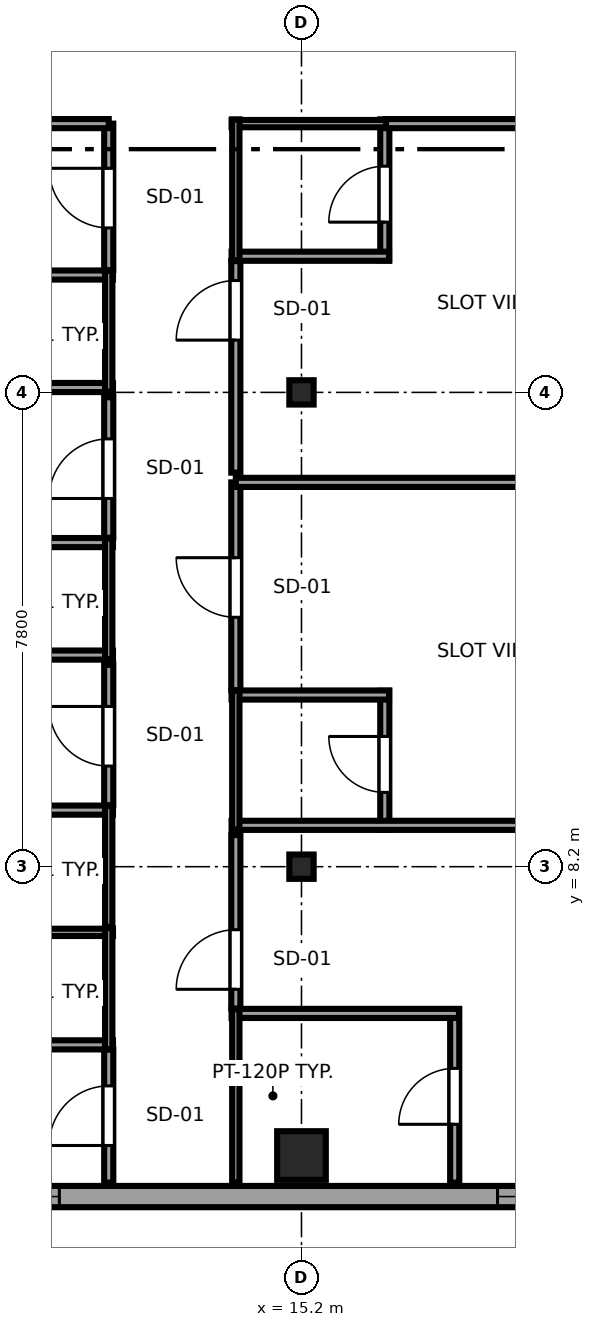
"""IFC4 building model, lengths in metres.
Left out: names, types, materials, properties, quantities, classifications, styles, units other than length and angle.
Written with IfcOpenShell. Run it as: python <this file> out.ifc"""

import sys

from ifc_helpers import new_model, si_unit, direction, frame, frame_2d, origin, origin_2d, place, context, subcontext, project, spatial, rectangle, i_section, extrude, source, transform, mapped, element, fill, save


model = new_model("IFC4")
c1 = context("Model", 3, precision=1e-05, world=origin(), true_north=direction((0.0, 1.0)))
c2 = subcontext(c1, "Body", "Model", "MODEL_VIEW")
j1 = project(units=[si_unit("LENGTHUNIT", "METRE"), si_unit("PLANEANGLEUNIT", "RADIAN")], contexts=[c1])
p1 = place(None, origin())
s1 = spatial("IfcSite", under=j1, at=p1, CompositionType="ELEMENT")
p2 = place(p1, origin())
s2 = spatial("IfcBuilding", under=s1, at=p2, CompositionType="ELEMENT")
p3 = place(p2, frame((0.0, 0.0, 191.1)))
s3 = spatial("IfcBuildingStorey", under=s2, at=p3, CompositionType="ELEMENT", Elevation=191.1)
m1 = source(origin(), c2, "Body", "SweptSolid", [
    extrude(rectangle(XDim=0.8, YDim=0.8, at=origin_2d()), origin(), (0.0, 0.0, 1.0), 3.55),
])
p4 = place(p3, frame((15.2, 3.45, 0.0), z_axis=(0.0, 0.0, 1.0), x_axis=(1.0, 0.0, 0.0)))
e1 = element("IfcColumn", 1, at=p4, inside=s3, PredefinedType="COLUMN", context=c2, shape_type="MappedRepresentation", body=[
    mapped(m1, transform((0.0, 0.0, 0.0), x_axis=(1.0, 0.0, 0.0), y_axis=(0.0, 1.0, 0.0), z_axis=(0.0, 0.0, 1.0), scale=1.0)),
])
m2 = source(origin(), c2, "Body", "SweptSolid", [
    extrude(i_section(OverallWidth=0.4, OverallDepth=0.4, WebThickness=0.02, FlangeThickness=0.035, at=origin_2d()), origin(), (0.0, 0.0, 1.0), 3.55),
])
for number, where, z_axis, x_axis in (
    (2, (15.2, 8.2, 0.0), (0.0, 0.0, 1.0), (1.0, 0.0, 0.0)),
    (3, (15.2, 16.0, 0.0), (0.0, 0.0, 1.0), (1.0, 0.0, 0.0)),
):
    element("IfcColumn", number, at=place(p3, frame(where, z_axis=z_axis, x_axis=x_axis)), inside=s3, PredefinedType="COLUMN", context=c2, shape_type="MappedRepresentation", body=[
        mapped(m2, transform((0.0, 0.0, 0.0), x_axis=(1.0, 0.0, 0.0), y_axis=(0.0, 1.0, 0.0), z_axis=(0.0, 0.0, 1.0), scale=1.0)),
    ])
p5 = place(p3, frame((7.017, 2.775, 0.0), z_axis=(0.0, 0.0, 1.0), x_axis=(1.0, 0.0, 0.0)))
e4 = element("IfcWall", 4, at=p5, inside=s3, PredefinedType="SOLIDWALL", context=c2, shape_type="SweptSolid", body=[
    extrude(rectangle(XDim=15.608, YDim=0.35, at=frame_2d((7.804, 0.0))), origin(), (0.0, 0.0, 1.0), 3.37),
])
p6 = place(p5, frame((1.801, 0.0, 0.68)))
e5 = element("IfcOpeningElement", 5, at=p6, cuts=e4, PredefinedType="OPENING", context=c2, shape_type="SweptSolid", body=[
    extrude(rectangle(XDim=2.4, YDim=1.9, at=frame_2d((1.2, 0.95))), frame((0.0, 0.185, 0.0), z_axis=(0.0, -1.0, 0.0), x_axis=(1.0, 0.0, 0.0)), (0.0, 0.0, 1.0), 0.37),
])
p7 = place(p5, frame((11.407, 0.0, 0.68)))
e6 = element("IfcOpeningElement", 6, at=p7, cuts=e4, PredefinedType="OPENING", context=c2, shape_type="SweptSolid", body=[
    extrude(rectangle(XDim=2.4, YDim=1.9, at=frame_2d((1.2, 0.95))), frame((0.0, 0.185, 0.0), z_axis=(0.0, -1.0, 0.0), x_axis=(1.0, 0.0, 0.0)), (0.0, 0.0, 1.0), 0.37),
])
p8 = place(p3, frame((9.51, 5.27, 0.0), z_axis=(0.0, 0.0, 1.0), x_axis=(1.0, 0.0, 0.0)))
e7 = element("IfcWall", 7, at=p8, inside=s3, PredefinedType="PARTITIONING", context=c2, shape_type="SweptSolid", body=[
    extrude(rectangle(XDim=2.59, YDim=0.15, at=frame_2d((1.295, 0.0))), origin(), (0.0, 0.0, 1.0), 3.37),
])
p9 = place(p3, frame((9.51, 7.12, 0.0), z_axis=(0.0, 0.0, 1.0), x_axis=(1.0, 0.0, 0.0)))
e8 = element("IfcWall", 8, at=p9, inside=s3, PredefinedType="PLUMBINGWALL", context=c2, shape_type="SweptSolid", body=[
    extrude(rectangle(XDim=2.59, YDim=0.12, at=frame_2d((1.295, 0.0))), origin(), (0.0, 0.0, 1.0), 3.37),
])
p10 = place(p3, frame((12.03, 5.2, 0.0), z_axis=(0.0, 0.0, 1.0), x_axis=(0.0, 1.0, 0.0)))
e9 = element("IfcWall", 9, at=p10, inside=s3, PredefinedType="PLUMBINGWALL", context=c2, shape_type="SweptSolid", body=[
    extrude(rectangle(XDim=1.99, YDim=0.12, at=frame_2d((0.995, 0.0))), origin(), (0.0, 0.0, 1.0), 3.37),
])
p11 = place(p3, frame((9.51, 9.13, 0.0), z_axis=(0.0, 0.0, 1.0), x_axis=(1.0, 0.0, 0.0)))
e10 = element("IfcWall", 10, at=p11, inside=s3, PredefinedType="PARTITIONING", context=c2, shape_type="SweptSolid", body=[
    extrude(rectangle(XDim=2.59, YDim=0.15, at=frame_2d((1.295, 0.0))), origin(), (0.0, 0.0, 1.0), 3.37),
])
p12 = place(p3, frame((12.03, 7.21, 0.0), z_axis=(0.0, 0.0, 1.0), x_axis=(0.0, 1.0, 0.0)))
e11 = element("IfcWall", 11, at=p12, inside=s3, PredefinedType="PLUMBINGWALL", context=c2, shape_type="SweptSolid", body=[
    extrude(rectangle(XDim=1.99, YDim=0.12, at=frame_2d((0.995, 0.0))), origin(), (0.0, 0.0, 1.0), 3.37),
])
p13 = place(p3, frame((3.005, 11.68, 0.0), z_axis=(0.0, 0.0, 1.0), x_axis=(1.0, 0.0, 0.0)))
e12 = element("IfcWall", 12, at=p13, inside=s3, PredefinedType="PARTITIONING", context=c2, shape_type="SweptSolid", body=[
    extrude(rectangle(XDim=9.095, YDim=0.15, at=frame_2d((4.548, 0.0))), origin(), (0.0, 0.0, 1.0), 3.37),
])
p14 = place(p3, frame((9.51, 13.53, 0.0), z_axis=(0.0, 0.0, 1.0), x_axis=(1.0, 0.0, 0.0)))
e13 = element("IfcWall", 13, at=p14, inside=s3, PredefinedType="PARTITIONING", context=c2, shape_type="SweptSolid", body=[
    extrude(rectangle(XDim=2.59, YDim=0.15, at=frame_2d((1.295, 0.0))), origin(), (0.0, 0.0, 1.0), 3.37),
])
p15 = place(p3, frame((12.03, 11.61, 0.0), z_axis=(0.0, 0.0, 1.0), x_axis=(0.0, 1.0, 0.0)))
e14 = element("IfcWall", 14, at=p15, inside=s3, PredefinedType="PLUMBINGWALL", context=c2, shape_type="SweptSolid", body=[
    extrude(rectangle(XDim=1.99, YDim=0.12, at=frame_2d((0.995, 0.0))), origin(), (0.0, 0.0, 1.0), 3.37),
])
p16 = place(p3, frame((3.005, 16.08, 0.0), z_axis=(0.0, 0.0, 1.0), x_axis=(1.0, 0.0, 0.0)))
e15 = element("IfcWall", 15, at=p16, inside=s3, PredefinedType="PARTITIONING", context=c2, shape_type="SweptSolid", body=[
    extrude(rectangle(XDim=9.095, YDim=0.15, at=frame_2d((4.548, 0.0))), origin(), (0.0, 0.0, 1.0), 2.758),
])
p17 = place(p3, frame((9.51, 17.93, 0.0), z_axis=(0.0, 0.0, 1.0), x_axis=(1.0, 0.0, 0.0)))
e16 = element("IfcWall", 16, at=p17, inside=s3, PredefinedType="PARTITIONING", context=c2, shape_type="SweptSolid", body=[
    extrude(rectangle(XDim=2.59, YDim=0.15, at=frame_2d((1.295, 0.0))), origin(), (0.0, 0.0, 1.0), 3.37),
])
p18 = place(p3, frame((12.03, 16.01, 0.0), z_axis=(0.0, 0.0, 1.0), x_axis=(0.0, 1.0, 0.0)))
e17 = element("IfcWall", 17, at=p18, inside=s3, PredefinedType="PLUMBINGWALL", context=c2, shape_type="SweptSolid", body=[
    extrude(rectangle(XDim=1.99, YDim=0.12, at=frame_2d((0.995, 0.0))), origin(), (0.0, 0.0, 1.0), 3.37),
])
p19 = place(p3, frame((17.72, 3.005, 0.0), z_axis=(0.0, 0.0, 1.0), x_axis=(0.0, 1.0, 0.0)))
e18 = element("IfcWall", 18, at=p19, inside=s3, PredefinedType="PARTITIONING", context=c2, shape_type="SweptSolid", body=[
    extrude(rectangle(XDim=2.852, YDim=0.15, at=frame_2d((1.426, 0.0))), origin(), (0.0, 0.0, 1.0), 3.37),
])
p20 = place(p19, frame((0.958, 0.0, 0.0)))
e19 = element("IfcOpeningElement", 19, at=p20, cuts=e18, PredefinedType="OPENING", context=c2, shape_type="SweptSolid", body=[
    extrude(rectangle(XDim=0.92, YDim=2.01, at=frame_2d((0.46, 1.005))), frame((0.0, 0.085, 0.0), z_axis=(0.0, -1.0, 0.0), x_axis=(1.0, 0.0, 0.0)), (0.0, 0.0, 1.0), 0.17),
])
p21 = place(p3, frame((14.05, 5.787, 0.0), z_axis=(0.0, 0.0, 1.0), x_axis=(1.0, 0.0, 0.0)))
e20 = element("IfcWall", 20, at=p21, inside=s3, PredefinedType="PARTITIONING", context=c2, shape_type="SweptSolid", body=[
    extrude(rectangle(XDim=3.74, YDim=0.15, at=frame_2d((1.87, 0.0))), origin(), (0.0, 0.0, 1.0), 3.37),
])
p22 = place(p3, frame((14.12, 3.005, 0.0), z_axis=(0.0, 0.0, 1.0), x_axis=(0.0, 1.0, 0.0)))
e21 = element("IfcWall", 21, at=p22, inside=s3, PredefinedType="PLUMBINGWALL", context=c2, shape_type="SweptSolid", body=[
    extrude(rectangle(XDim=2.852, YDim=0.12, at=frame_2d((1.426, 0.0))), origin(), (0.0, 0.0, 1.0), 3.37),
])
p23 = place(p3, frame((16.57, 8.81, 0.0), z_axis=(0.0, 0.0, 1.0), x_axis=(0.0, 1.0, 0.0)))
e22 = element("IfcWall", 22, at=p23, inside=s3, PredefinedType="PARTITIONING", context=c2, shape_type="SweptSolid", body=[
    extrude(rectangle(XDim=2.283, YDim=0.15, at=frame_2d((1.142, 0.0))), origin(), (0.0, 0.0, 1.0), 3.37),
])
p24 = place(p23, frame((0.612, 0.0, 0.0)))
e23 = element("IfcOpeningElement", 23, at=p24, cuts=e22, PredefinedType="OPENING", context=c2, shape_type="SweptSolid", body=[
    extrude(rectangle(XDim=0.92, YDim=2.01, at=frame_2d((0.46, 1.005))), frame((0.0, 0.085, 0.0), z_axis=(0.0, -1.0, 0.0), x_axis=(1.0, 0.0, 0.0)), (0.0, 0.0, 1.0), 0.17),
])
p25 = place(p3, frame((14.05, 8.88, 0.0), z_axis=(0.0, 0.0, 1.0), x_axis=(1.0, 0.0, 0.0)))
e24 = element("IfcWall", 24, at=p25, inside=s3, PredefinedType="PARTITIONING", context=c2, shape_type="SweptSolid", body=[
    extrude(rectangle(XDim=8.3, YDim=0.15, at=frame_2d((4.15, 0.0))), origin(), (0.0, 0.0, 1.0), 3.37),
])
p26 = place(p3, frame((14.05, 11.023, 0.0), z_axis=(0.0, 0.0, 1.0), x_axis=(1.0, 0.0, 0.0)))
e25 = element("IfcWall", 25, at=p26, inside=s3, PredefinedType="PARTITIONING", context=c2, shape_type="SweptSolid", body=[
    extrude(rectangle(XDim=2.59, YDim=0.15, at=frame_2d((1.295, 0.0))), origin(), (0.0, 0.0, 1.0), 3.37),
])
p27 = place(p3, frame((14.12, 8.81, 0.0), z_axis=(0.0, 0.0, 1.0), x_axis=(0.0, 1.0, 0.0)))
e26 = element("IfcWall", 26, at=p27, inside=s3, PredefinedType="PLUMBINGWALL", context=c2, shape_type="SweptSolid", body=[
    extrude(rectangle(XDim=2.283, YDim=0.12, at=frame_2d((1.142, 0.0))), origin(), (0.0, 0.0, 1.0), 3.37),
])
p28 = place(p3, frame((16.57, 18.169, 0.0), z_axis=(0.0, 0.0, 1.0), x_axis=(0.0, 1.0, 0.0)))
e27 = element("IfcWall", 27, at=p28, inside=s3, PredefinedType="PARTITIONING", context=c2, shape_type="SweptSolid", body=[
    extrude(rectangle(XDim=2.321, YDim=0.15, at=frame_2d((1.161, 0.0))), origin(), (0.0, 0.0, 1.0), 3.37),
])
p29 = place(p28, frame((0.631, 0.0, 0.0)))
e28 = element("IfcOpeningElement", 28, at=p29, cuts=e27, PredefinedType="OPENING", context=c2, shape_type="SweptSolid", body=[
    extrude(rectangle(XDim=0.92, YDim=2.01, at=frame_2d((0.46, 1.005))), frame((0.0, 0.085, 0.0), z_axis=(0.0, -1.0, 0.0), x_axis=(1.0, 0.0, 0.0)), (0.0, 0.0, 1.0), 0.17),
])
p30 = place(p3, frame((14.05, 18.239, 0.0), z_axis=(0.0, 0.0, 1.0), x_axis=(1.0, 0.0, 0.0)))
e29 = element("IfcWall", 29, at=p30, inside=s3, PredefinedType="PARTITIONING", context=c2, shape_type="SweptSolid", body=[
    extrude(rectangle(XDim=2.59, YDim=0.15, at=frame_2d((1.295, 0.0))), origin(), (0.0, 0.0, 1.0), 3.37),
])
p31 = place(p3, frame((14.05, 20.42, 0.0), z_axis=(0.0, 0.0, 1.0), x_axis=(1.0, 0.0, 0.0)))
e30 = element("IfcWall", 30, at=p31, inside=s3, PredefinedType="PLUMBINGWALL", context=c2, shape_type="SweptSolid", body=[
    extrude(rectangle(XDim=2.59, YDim=0.12, at=frame_2d((1.295, 0.0))), origin(), (0.0, 0.0, 1.0), 3.37),
])
p32 = place(p3, frame((14.12, 18.169, 0.0), z_axis=(0.0, 0.0, 1.0), x_axis=(0.0, 1.0, 0.0)))
e31 = element("IfcWall", 31, at=p32, inside=s3, PredefinedType="PLUMBINGWALL", context=c2, shape_type="SweptSolid", body=[
    extrude(rectangle(XDim=2.321, YDim=0.12, at=frame_2d((1.161, 0.0))), origin(), (0.0, 0.0, 1.0), 3.37),
])
p33 = place(p3, frame((12.03, 3.005, 0.0), z_axis=(0.0, 0.0, 1.0), x_axis=(0.0, 1.0, 0.0)))
e32 = element("IfcWall", 32, at=p33, inside=s3, PredefinedType="PARTITIONING", context=c2, shape_type="SweptSolid", body=[
    extrude(rectangle(XDim=2.185, YDim=0.15, at=frame_2d((1.093, 0.0))), origin(), (0.0, 0.0, 1.0), 3.37),
])
p34 = place(p33, frame((0.61, 0.0, 0.0)))
e33 = element("IfcOpeningElement", 33, at=p34, cuts=e32, PredefinedType="OPENING", context=c2, shape_type="SweptSolid", body=[
    extrude(rectangle(XDim=0.98, YDim=2.12, at=frame_2d((0.49, 1.06))), frame((0.0, 0.085, 0.0), z_axis=(0.0, -1.0, 0.0), x_axis=(1.0, 0.0, 0.0)), (0.0, 0.0, 1.0), 0.17),
])
p35 = place(p3, frame((12.03, 9.21, 0.0), z_axis=(0.0, 0.0, 1.0), x_axis=(0.0, 1.0, 0.0)))
e34 = element("IfcWall", 34, at=p35, inside=s3, PredefinedType="PARTITIONING", context=c2, shape_type="SweptSolid", body=[
    extrude(rectangle(XDim=2.31, YDim=0.15, at=frame_2d((1.155, 0.0))), origin(), (0.0, 0.0, 1.0), 3.37),
])
p36 = place(p35, frame((0.645, 0.0, 0.0)))
e35 = element("IfcOpeningElement", 35, at=p36, cuts=e34, PredefinedType="OPENING", context=c2, shape_type="SweptSolid", body=[
    extrude(rectangle(XDim=0.98, YDim=2.12, at=frame_2d((0.49, 1.06))), frame((0.0, 0.085, 0.0), z_axis=(0.0, -1.0, 0.0), x_axis=(1.0, 0.0, 0.0)), (0.0, 0.0, 1.0), 0.17),
])
p37 = place(p3, frame((12.03, 13.61, 0.0), z_axis=(0.0, 0.0, 1.0), x_axis=(0.0, 1.0, 0.0)))
e36 = element("IfcWall", 36, at=p37, inside=s3, PredefinedType="PARTITIONING", context=c2, shape_type="SweptSolid", body=[
    extrude(rectangle(XDim=2.31, YDim=0.15, at=frame_2d((1.155, 0.0))), origin(), (0.0, 0.0, 1.0), 3.37),
])
p38 = place(p37, frame((0.645, 0.0, 0.0)))
e37 = element("IfcOpeningElement", 37, at=p38, cuts=e36, PredefinedType="OPENING", context=c2, shape_type="SweptSolid", body=[
    extrude(rectangle(XDim=0.98, YDim=2.12, at=frame_2d((0.49, 1.06))), frame((0.0, 0.085, 0.0), z_axis=(0.0, -1.0, 0.0), x_axis=(1.0, 0.0, 0.0)), (0.0, 0.0, 1.0), 0.17),
])
p39 = place(p3, frame((12.03, 18.01, 0.0), z_axis=(0.0, 0.0, 1.0), x_axis=(0.0, 1.0, 0.0)))
e38 = element("IfcWall", 38, at=p39, inside=s3, PredefinedType="PARTITIONING", context=c2, shape_type="SweptSolid", body=[
    extrude(rectangle(XDim=2.41, YDim=0.15, at=frame_2d((1.205, 0.0))), origin(), (0.0, 0.0, 1.0), 3.37),
])
p40 = place(p39, frame((0.695, 0.0, 0.0)))
e39 = element("IfcOpeningElement", 39, at=p40, cuts=e38, PredefinedType="OPENING", context=c2, shape_type="SweptSolid", body=[
    extrude(rectangle(XDim=0.98, YDim=2.12, at=frame_2d((0.49, 1.06))), frame((0.0, 0.085, 0.0), z_axis=(0.0, -1.0, 0.0), x_axis=(1.0, 0.0, 0.0)), (0.0, 0.0, 1.0), 0.17),
])
p41 = place(p3, frame((3.005, 20.42, 0.0), z_axis=(0.0, 0.0, 1.0), x_axis=(1.0, 0.0, 0.0)))
e40 = element("IfcWall", 40, at=p41, inside=s3, PredefinedType="PARTITIONING", context=c2, shape_type="SweptSolid", body=[
    extrude(rectangle(XDim=9.025, YDim=0.15, at=frame_2d((4.513, 0.0))), origin(), (0.0, 0.0, 1.0), 3.37),
])
p42 = place(p3, frame((14.12, 5.867, 0.0), z_axis=(0.0, 0.0, 1.0), x_axis=(0.0, 1.0, 0.0)))
e41 = element("IfcWall", 41, at=p42, inside=s3, PredefinedType="PARTITIONING", context=c2, shape_type="SweptSolid", body=[
    extrude(rectangle(XDim=2.853, YDim=0.15, at=frame_2d((1.427, 0.0))), origin(), (0.0, 0.0, 1.0), 3.37),
])
p43 = place(p42, frame((0.316, 0.0, 0.0)))
e42 = element("IfcOpeningElement", 42, at=p43, cuts=e41, PredefinedType="OPENING", context=c2, shape_type="SweptSolid", body=[
    extrude(rectangle(XDim=0.98, YDim=2.12, at=frame_2d((0.49, 1.06))), frame((0.0, 0.085, 0.0), z_axis=(0.0, -1.0, 0.0), x_axis=(1.0, 0.0, 0.0)), (0.0, 0.0, 1.0), 0.17),
])
p44 = place(p3, frame((14.12, 11.103, 0.0), z_axis=(0.0, 0.0, 1.0), x_axis=(0.0, 1.0, 0.0)))
e43 = element("IfcWall", 43, at=p44, inside=s3, PredefinedType="PARTITIONING", context=c2, shape_type="SweptSolid", body=[
    extrude(rectangle(XDim=3.417, YDim=0.15, at=frame_2d((1.708, 0.0))), origin(), (0.0, 0.0, 1.0), 3.37),
])
p45 = place(p44, frame((1.198, 0.0, 0.0)))
e44 = element("IfcOpeningElement", 44, at=p45, cuts=e43, PredefinedType="OPENING", context=c2, shape_type="SweptSolid", body=[
    extrude(rectangle(XDim=0.98, YDim=2.12, at=frame_2d((0.49, 1.06))), frame((0.0, 0.085, 0.0), z_axis=(0.0, -1.0, 0.0), x_axis=(1.0, 0.0, 0.0)), (0.0, 0.0, 1.0), 0.17),
])
p46 = place(p3, frame((14.12, 14.52, 0.0), z_axis=(0.0, 0.0, 1.0), x_axis=(1.0, 0.0, 0.0)))
e45 = element("IfcWall", 45, at=p46, inside=s3, PredefinedType="PARTITIONING", context=c2, shape_type="SweptSolid", body=[
    extrude(rectangle(XDim=8.23, YDim=0.15, at=frame_2d((4.115, 0.0))), origin(), (0.0, 0.0, 1.0), 3.37),
])
p47 = place(p3, frame((14.12, 14.68, 0.0), z_axis=(0.0, 0.0, 1.0), x_axis=(0.0, 1.0, 0.0)))
e46 = element("IfcWall", 46, at=p47, inside=s3, PredefinedType="PARTITIONING", context=c2, shape_type="SweptSolid", body=[
    extrude(rectangle(XDim=3.479, YDim=0.15, at=frame_2d((1.74, 0.0))), origin(), (0.0, 0.0, 1.0), 3.37),
])
p48 = place(p47, frame((2.179, 0.0, 0.0)))
e47 = element("IfcOpeningElement", 47, at=p48, cuts=e46, PredefinedType="OPENING", context=c2, shape_type="SweptSolid", body=[
    extrude(rectangle(XDim=0.98, YDim=2.12, at=frame_2d((0.49, 1.06))), frame((0.0, 0.085, 0.0), z_axis=(0.0, -1.0, 0.0), x_axis=(1.0, 0.0, 0.0)), (0.0, 0.0, 1.0), 0.17),
])
p49 = place(p3, frame((16.59, 20.42, 0.0), z_axis=(0.0, 0.0, 1.0), x_axis=(1.0, 0.0, 0.0)))
e48 = element("IfcWall", 48, at=p49, inside=s3, PredefinedType="PARTITIONING", context=c2, shape_type="SweptSolid", body=[
    extrude(rectangle(XDim=5.76, YDim=0.15, at=frame_2d((2.88, 0.0))), origin(), (0.0, 0.0, 1.0), 3.37),
])
m3 = source(origin(), c2, "Body", "SweptSolid", [
    extrude(rectangle(XDim=2.4, YDim=1.9, at=frame_2d((1.2, 0.95))), frame((0.0, 0.09, 0.0), z_axis=(0.0, -1.0, 0.0), x_axis=(1.0, 0.0, 0.0)), (0.0, 0.0, 1.0), 0.06),
])
p50 = place(p6, origin())
e49 = element("IfcWindow", 49, at=p50, inside=s3, PartitioningType="TRIPLE_PANEL_HORIZONTAL", PredefinedType="WINDOW", context=c2, shape_type="MappedRepresentation", body=[
    mapped(m3, transform((0.0, 0.0, 0.0), x_axis=(1.0, 0.0, 0.0), y_axis=(0.0, 1.0, 0.0), z_axis=(0.0, 0.0, 1.0), scale=1.0)),
])
fill(e5, e49)
p51 = place(p7, origin())
e50 = element("IfcWindow", 50, at=p51, inside=s3, PartitioningType="TRIPLE_PANEL_HORIZONTAL", PredefinedType="WINDOW", context=c2, shape_type="MappedRepresentation", body=[
    mapped(m3, transform((0.0, 0.0, 0.0), x_axis=(1.0, 0.0, 0.0), y_axis=(0.0, 1.0, 0.0), z_axis=(0.0, 0.0, 1.0), scale=1.0)),
])
fill(e6, e50)
m4 = source(origin(), c2, "Body", "SweptSolid", [
    extrude(rectangle(XDim=0.92, YDim=2.01, at=frame_2d((0.46, 1.005))), frame((0.0, 0.025, 0.0), z_axis=(0.0, -1.0, 0.0), x_axis=(1.0, 0.0, 0.0)), (0.0, 0.0, 1.0), 0.05),
])
p52 = place(p20, origin())
e51 = element("IfcDoor", 51, at=p52, inside=s3, OperationType="SINGLE_SWING_LEFT", PredefinedType="DOOR", context=c2, shape_type="MappedRepresentation", body=[
    mapped(m4, transform((0.0, 0.0, 0.0), x_axis=(1.0, 0.0, 0.0), y_axis=(0.0, 1.0, 0.0), z_axis=(0.0, 0.0, 1.0), scale=1.0)),
])
fill(e19, e51)
p53 = place(p24, origin())
e52 = element("IfcDoor", 52, at=p53, inside=s3, OperationType="SINGLE_SWING_RIGHT", PredefinedType="DOOR", context=c2, shape_type="MappedRepresentation", body=[
    mapped(m4, transform((0.0, 0.0, 0.0), x_axis=(1.0, 0.0, 0.0), y_axis=(0.0, 1.0, 0.0), z_axis=(0.0, 0.0, 1.0), scale=1.0)),
])
fill(e23, e52)
p54 = place(p29, origin())
e53 = element("IfcDoor", 53, at=p54, inside=s3, OperationType="SINGLE_SWING_LEFT", PredefinedType="DOOR", context=c2, shape_type="MappedRepresentation", body=[
    mapped(m4, transform((0.0, 0.0, 0.0), x_axis=(1.0, 0.0, 0.0), y_axis=(0.0, 1.0, 0.0), z_axis=(0.0, 0.0, 1.0), scale=1.0)),
])
fill(e28, e53)
m5 = source(origin(), c2, "Body", "SweptSolid", [
    extrude(rectangle(XDim=0.98, YDim=2.12, at=frame_2d((0.49, 1.06))), frame((0.0, 0.025, 0.0), z_axis=(0.0, -1.0, 0.0), x_axis=(1.0, 0.0, 0.0)), (0.0, 0.0, 1.0), 0.05),
])
p55 = place(p34, origin())
e54 = element("IfcDoor", 54, at=p55, inside=s3, OperationType="SINGLE_SWING_LEFT", PredefinedType="DOOR", context=c2, shape_type="MappedRepresentation", body=[
    mapped(m5, transform((0.0, 0.0, 0.0), x_axis=(1.0, 0.0, 0.0), y_axis=(0.0, 1.0, 0.0), z_axis=(0.0, 0.0, 1.0), scale=1.0)),
])
fill(e33, e54)
p56 = place(p36, origin())
e55 = element("IfcDoor", 55, at=p56, inside=s3, OperationType="SINGLE_SWING_RIGHT", PredefinedType="DOOR", context=c2, shape_type="MappedRepresentation", body=[
    mapped(m5, transform((0.0, 0.0, 0.0), x_axis=(1.0, 0.0, 0.0), y_axis=(0.0, 1.0, 0.0), z_axis=(0.0, 0.0, 1.0), scale=1.0)),
])
fill(e35, e55)
p57 = place(p38, origin())
e56 = element("IfcDoor", 56, at=p57, inside=s3, OperationType="SINGLE_SWING_LEFT", PredefinedType="DOOR", context=c2, shape_type="MappedRepresentation", body=[
    mapped(m5, transform((0.0, 0.0, 0.0), x_axis=(1.0, 0.0, 0.0), y_axis=(0.0, 1.0, 0.0), z_axis=(0.0, 0.0, 1.0), scale=1.0)),
])
fill(e37, e56)
p58 = place(p40, origin())
e57 = element("IfcDoor", 57, at=p58, inside=s3, OperationType="SINGLE_SWING_RIGHT", PredefinedType="DOOR", context=c2, shape_type="MappedRepresentation", body=[
    mapped(m5, transform((0.0, 0.0, 0.0), x_axis=(1.0, 0.0, 0.0), y_axis=(0.0, 1.0, 0.0), z_axis=(0.0, 0.0, 1.0), scale=1.0)),
])
fill(e39, e57)
p59 = place(p43, origin())
e58 = element("IfcDoor", 58, at=p59, inside=s3, OperationType="SINGLE_SWING_LEFT", PredefinedType="DOOR", context=c2, shape_type="MappedRepresentation", body=[
    mapped(m5, transform((0.0, 0.0, 0.0), x_axis=(1.0, 0.0, 0.0), y_axis=(0.0, 1.0, 0.0), z_axis=(0.0, 0.0, 1.0), scale=1.0)),
])
fill(e42, e58)
p60 = place(p45, origin())
e59 = element("IfcDoor", 59, at=p60, inside=s3, OperationType="SINGLE_SWING_RIGHT", PredefinedType="DOOR", context=c2, shape_type="MappedRepresentation", body=[
    mapped(m5, transform((0.0, 0.0, 0.0), x_axis=(1.0, 0.0, 0.0), y_axis=(0.0, 1.0, 0.0), z_axis=(0.0, 0.0, 1.0), scale=1.0)),
])
fill(e44, e59)
p61 = place(p48, origin())
e60 = element("IfcDoor", 60, at=p61, inside=s3, OperationType="SINGLE_SWING_LEFT", PredefinedType="DOOR", context=c2, shape_type="MappedRepresentation", body=[
    mapped(m5, transform((0.0, 0.0, 0.0), x_axis=(1.0, 0.0, 0.0), y_axis=(0.0, 1.0, 0.0), z_axis=(0.0, 0.0, 1.0), scale=1.0)),
])
fill(e47, e60)
save(model, sys.argv[1])
